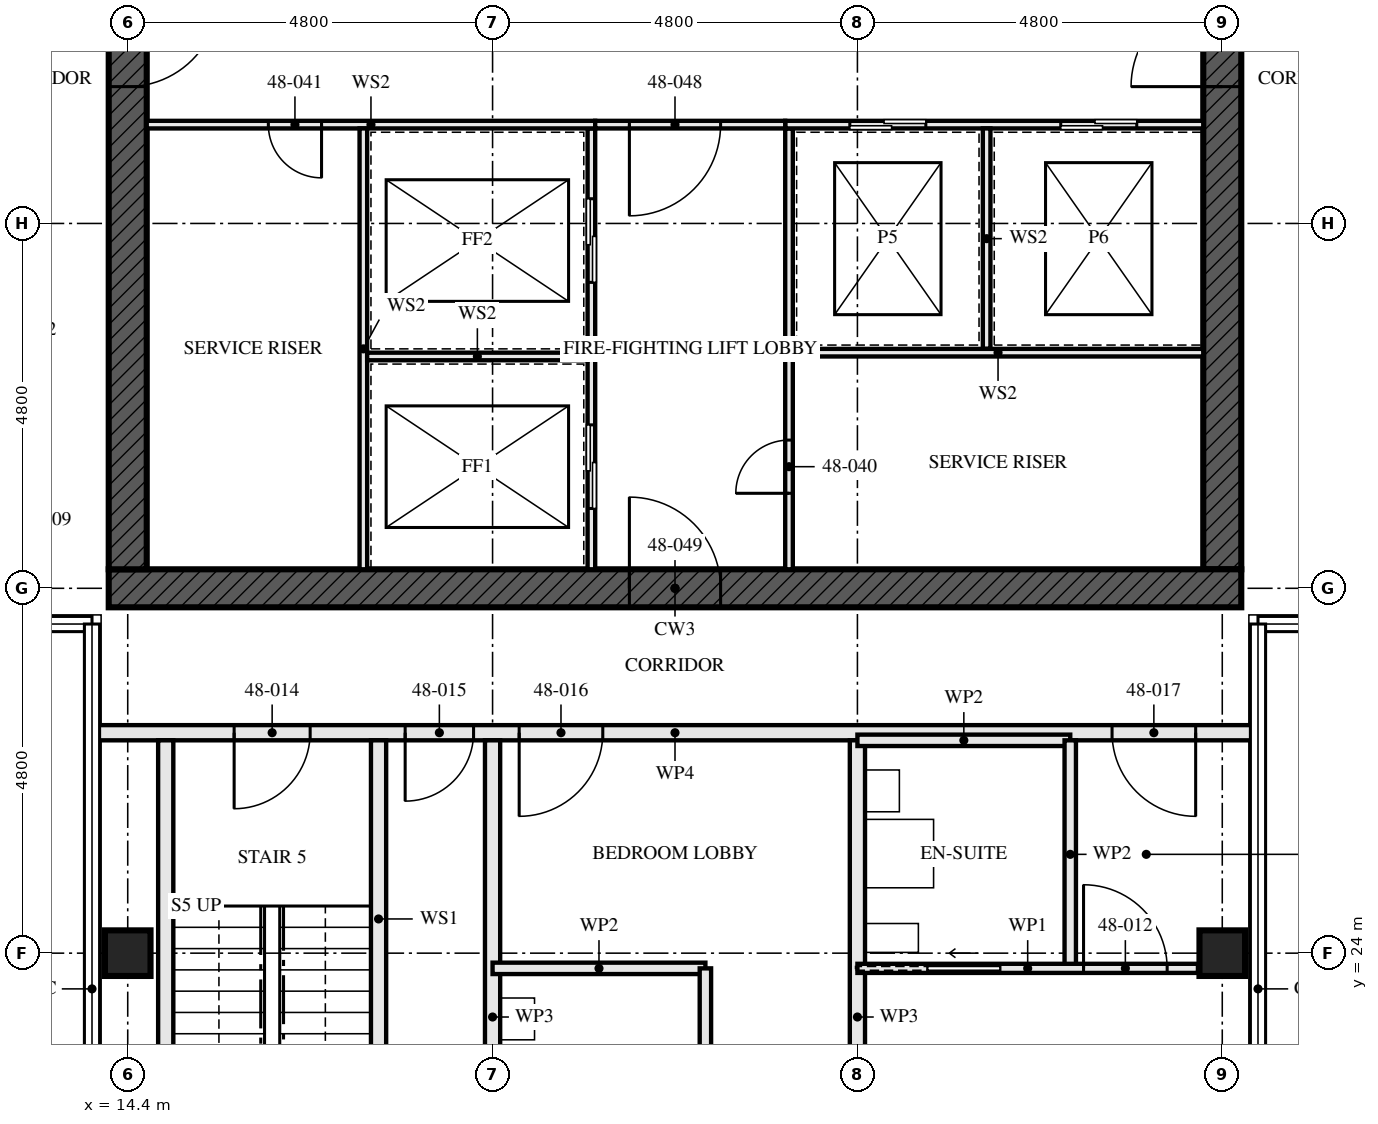
"""IFC4 building model, lengths in metres.
Left out: names, types, materials, properties, quantities, classifications, styles, units other than length and angle.
Written with IfcOpenShell. Run it as: python <this file> out.ifc"""

import sys

from ifc_helpers import new_model, si_unit, direction, frame, frame_2d, origin, origin_2d, place, context, subcontext, project, spatial, rectangle, hollow_rectangle, extrude, element, fill, save


model = new_model("IFC4")
c1 = context("Model", 3, precision=1e-05, world=origin(), true_north=direction((0.0, 1.0)))
c2 = subcontext(c1, "Body", "Model", "MODEL_VIEW")
j1 = project(units=[si_unit("LENGTHUNIT", "METRE"), si_unit("PLANEANGLEUNIT", "RADIAN")], contexts=[c1])
p1 = place(None, origin())
s1 = spatial("IfcSite", under=j1, at=p1, CompositionType="ELEMENT")
p2 = place(p1, origin())
s2 = spatial("IfcBuilding", under=s1, at=p2, CompositionType="ELEMENT")
p3 = place(p2, frame((0.0, 0.0, 176.0)))
s3 = spatial("IfcBuildingStorey", under=s2, at=p3, CompositionType="ELEMENT", Elevation=176.0)
for number, where, z_axis, x_axis in (
    (1, (14.4, 24.0, 0.0), (0.0, 0.0, 1.0), (1.0, 0.0, 0.0)),
    (2, (28.8, 24.0, 0.0), (0.0, 0.0, 1.0), (1.0, 0.0, 0.0)),
):
    element("IfcColumn", number, at=place(p3, frame(where, z_axis=z_axis, x_axis=x_axis)), inside=s3, PredefinedType="COLUMN", context=c2, shape_type="SweptSolid", body=[
        extrude(hollow_rectangle(XDim=0.6, YDim=0.6, WallThickness=0.08, at=origin_2d()), origin(), (0.0, 0.0, 1.0), 3.5),
    ])
p4 = place(p3, frame((14.15, 28.8, -0.17), z_axis=(0.0, 0.0, 1.0), x_axis=(1.0, 0.0, 0.0)))
e3 = element("IfcWall", 3, at=p4, inside=s3, PredefinedType="SHEAR", context=c2, shape_type="SweptSolid", body=[
    extrude(rectangle(XDim=14.9, YDim=0.5, at=frame_2d((7.45, 0.0))), origin(), (0.0, 0.0, 1.0), 3.5),
])
p5 = place(p4, frame((6.85, 0.0, 0.17)))
e4 = element("IfcOpeningElement", 4, at=p5, cuts=e3, PredefinedType="OPENING", context=c2, shape_type="SweptSolid", body=[
    extrude(rectangle(XDim=1.2, YDim=2.1, at=frame_2d((0.6, 1.05))), frame((0.0, 0.26, 0.0), z_axis=(0.0, -1.0, 0.0), x_axis=(1.0, 0.0, 0.0)), (0.0, 0.0, 1.0), 0.521),
])
p6 = place(p3, frame((14.4, 42.95, -0.17), z_axis=(0.0, 0.0, 1.0), x_axis=(0.0, -1.0, 0.0)))
e5 = element("IfcWall", 5, at=p6, inside=s3, PredefinedType="SHEAR", context=c2, shape_type="SweptSolid", body=[
    extrude(rectangle(XDim=13.9, YDim=0.5, at=frame_2d((6.95, 0.0))), origin(), (0.0, 0.0, 1.0), 3.5),
])
p7 = place(p6, frame((6.35, 0.0, 0.17)))
e6 = element("IfcOpeningElement", 6, at=p7, cuts=e5, PredefinedType="OPENING", context=c2, shape_type="SweptSolid", body=[
    extrude(rectangle(XDim=1.2, YDim=2.1, at=frame_2d((0.6, 1.05))), frame((0.0, 0.26, 0.0), z_axis=(0.0, -1.0, 0.0), x_axis=(1.0, 0.0, 0.0)), (0.0, 0.0, 1.0), 0.521),
])
p8 = place(p3, frame((28.8, 29.05, -0.17), z_axis=(0.0, 0.0, 1.0), x_axis=(0.0, 1.0, 0.0)))
e7 = element("IfcWall", 7, at=p8, inside=s3, PredefinedType="SHEAR", context=c2, shape_type="SweptSolid", body=[
    extrude(rectangle(XDim=13.9, YDim=0.5, at=frame_2d((6.95, 0.0))), origin(), (0.0, 0.0, 1.0), 3.5),
])
p9 = place(p8, frame((6.35, 0.0, 0.17)))
e8 = element("IfcOpeningElement", 8, at=p9, cuts=e7, PredefinedType="OPENING", context=c2, shape_type="SweptSolid", body=[
    extrude(rectangle(XDim=1.2, YDim=2.1, at=frame_2d((0.6, 1.05))), frame((0.0, 0.26, 0.0), z_axis=(0.0, -1.0, 0.0), x_axis=(1.0, 0.0, 0.0)), (0.0, 0.0, 1.0), 0.521),
])
for number, where, z_axis, x_axis in (
    (9, (14.9, 22.1, 0.0), (0.0, 0.0, 1.0), (0.0, 1.0, 0.0)),
    (10, (17.7, 22.1, 0.0), (0.0, 0.0, 1.0), (0.0, 1.0, 0.0)),
):
    element("IfcWall", number, at=place(p3, frame(where, z_axis=z_axis, x_axis=x_axis)), inside=s3, PredefinedType="SOLIDWALL", context=c2, shape_type="SweptSolid", body=[
        extrude(rectangle(XDim=4.7, YDim=0.2, at=frame_2d((2.35, 0.0))), origin(), (0.0, 0.0, 1.0), 2.99),
    ])
p10 = place(p3, frame((19.2, 19.52, 0.0), z_axis=(0.0, 0.0, 1.0), x_axis=(0.0, 1.0, 0.0)))
e11 = element("IfcWall", 11, at=p10, inside=s3, PredefinedType="PARTITIONING", context=c2, shape_type="SweptSolid", body=[
    extrude(rectangle(XDim=7.28, YDim=0.2, at=frame_2d((3.64, 0.0))), origin(), (0.0, 0.0, 1.0), 2.55),
])
p11 = place(p3, frame((22.0, 20.8, 0.0), z_axis=(0.0, 0.0, 1.0), x_axis=(0.0, 1.0, 0.0)))
e12 = element("IfcWall", 12, at=p11, inside=s3, PredefinedType="PARTITIONING", context=c2, shape_type="SweptSolid", body=[
    extrude(rectangle(XDim=3.0, YDim=0.15, at=frame_2d((1.5, 0.0))), origin(), (0.0, 0.0, 1.0), 3.33),
])
p12 = place(p3, frame((19.2, 23.8, 0.0), z_axis=(0.0, 0.0, 1.0), x_axis=(1.0, 0.0, 0.0)))
e13 = element("IfcWall", 13, at=p12, inside=s3, PredefinedType="PARTITIONING", context=c2, shape_type="SweptSolid", body=[
    extrude(rectangle(XDim=2.8, YDim=0.15, at=frame_2d((1.4, 0.0))), origin(), (0.0, 0.0, 1.0), 3.33),
])
p13 = place(p3, frame((24.0, 19.52, 0.0), z_axis=(0.0, 0.0, 1.0), x_axis=(0.0, 1.0, 0.0)))
e14 = element("IfcWall", 14, at=p13, inside=s3, PredefinedType="PARTITIONING", context=c2, shape_type="SweptSolid", body=[
    extrude(rectangle(XDim=7.28, YDim=0.2, at=frame_2d((3.64, 0.0))), origin(), (0.0, 0.0, 1.0), 2.55),
])
p14 = place(p3, frame((26.8, 23.8, 0.0), z_axis=(0.0, 0.0, 1.0), x_axis=(0.0, 1.0, 0.0)))
e15 = element("IfcWall", 15, at=p14, inside=s3, PredefinedType="PARTITIONING", context=c2, shape_type="SweptSolid", body=[
    extrude(rectangle(XDim=3.0, YDim=0.15, at=frame_2d((1.5, 0.0))), origin(), (0.0, 0.0, 1.0), 2.55),
])
p15 = place(p3, frame((24.0, 26.8, 0.0), z_axis=(0.0, 0.0, 1.0), x_axis=(1.0, 0.0, 0.0)))
e16 = element("IfcWall", 16, at=p15, inside=s3, PredefinedType="PARTITIONING", context=c2, shape_type="SweptSolid", body=[
    extrude(rectangle(XDim=2.8, YDim=0.15, at=frame_2d((1.4, 0.0))), origin(), (0.0, 0.0, 1.0), 3.33),
])
p16 = place(p3, frame((24.0, 23.8, 0.0), z_axis=(0.0, 0.0, 1.0), x_axis=(1.0, 0.0, 0.0)))
e17 = element("IfcWall", 17, at=p16, inside=s3, PredefinedType="PARTITIONING", context=c2, shape_type="SweptSolid", body=[
    extrude(rectangle(XDim=4.48, YDim=0.12, at=frame_2d((2.24, 0.0))), origin(), (0.0, 0.0, 1.0), 3.33),
])
p17 = place(p16, frame((2.975, 0.0, 0.0)))
e18 = element("IfcOpeningElement", 18, at=p17, cuts=e17, PredefinedType="OPENING", context=c2, shape_type="SweptSolid", body=[
    extrude(rectangle(XDim=1.1, YDim=2.1, at=frame_2d((0.55, 1.05))), frame((0.0, 0.071, 0.0), z_axis=(0.0, -1.0, 0.0), x_axis=(1.0, 0.0, 0.0)), (0.0, 0.0, 1.0), 0.141),
])
p18 = place(p16, frame((0.925, 0.0, 0.0)))
e19 = element("IfcOpeningElement", 19, at=p18, cuts=e17, PredefinedType="OPENING", context=c2, shape_type="SweptSolid", body=[
    extrude(rectangle(XDim=0.95, YDim=2.1, at=frame_2d((0.475, 1.05))), frame((0.0, 0.071, 0.0), z_axis=(0.0, -1.0, 0.0), x_axis=(1.0, 0.0, 0.0)), (0.0, 0.0, 1.0), 0.141),
])
p19 = place(p3, frame((13.95, 26.9, 0.0), z_axis=(0.0, 0.0, 1.0), x_axis=(1.0, 0.0, 0.0)))
e20 = element("IfcWall", 20, at=p19, inside=s3, PredefinedType="PARTITIONING", context=c2, shape_type="SweptSolid", body=[
    extrude(rectangle(XDim=15.3, YDim=0.2, at=frame_2d((7.65, 0.0))), origin(), (0.0, 0.0, 1.0), 2.32),
])
p20 = place(p19, frame((1.85, 0.0, 0.0)))
e21 = element("IfcOpeningElement", 21, at=p20, cuts=e20, PredefinedType="OPENING", context=c2, shape_type="SweptSolid", body=[
    extrude(rectangle(XDim=1.0, YDim=2.1, at=frame_2d((0.5, 1.05))), frame((0.0, 0.111, 0.0), z_axis=(0.0, -1.0, 0.0), x_axis=(1.0, 0.0, 0.0)), (0.0, 0.0, 1.0), 0.221),
])
p21 = place(p19, frame((4.1, 0.0, 0.0)))
e22 = element("IfcOpeningElement", 22, at=p21, cuts=e20, PredefinedType="OPENING", context=c2, shape_type="SweptSolid", body=[
    extrude(rectangle(XDim=0.9, YDim=2.1, at=frame_2d((0.45, 1.05))), frame((0.0, 0.111, 0.0), z_axis=(0.0, -1.0, 0.0), x_axis=(1.0, 0.0, 0.0)), (0.0, 0.0, 1.0), 0.221),
])
p22 = place(p19, frame((5.6, 0.0, 0.0)))
e23 = element("IfcOpeningElement", 23, at=p22, cuts=e20, PredefinedType="OPENING", context=c2, shape_type="SweptSolid", body=[
    extrude(rectangle(XDim=1.1, YDim=2.1, at=frame_2d((0.55, 1.05))), frame((0.0, 0.111, 0.0), z_axis=(0.0, -1.0, 0.0), x_axis=(1.0, 0.0, 0.0)), (0.0, 0.0, 1.0), 0.221),
])
p23 = place(p19, frame((13.4, 0.0, 0.0)))
e24 = element("IfcOpeningElement", 24, at=p23, cuts=e20, PredefinedType="OPENING", context=c2, shape_type="SweptSolid", body=[
    extrude(rectangle(XDim=1.1, YDim=2.1, at=frame_2d((0.55, 1.05))), frame((0.0, 0.111, 0.0), z_axis=(0.0, -1.0, 0.0), x_axis=(1.0, 0.0, 0.0)), (0.0, 0.0, 1.0), 0.221),
])
p24 = place(p3, frame((20.5, 29.05, 0.0), z_axis=(0.0, 0.0, 1.0), x_axis=(0.0, 1.0, 0.0)))
e25 = element("IfcWall", 25, at=p24, inside=s3, PredefinedType="SOLIDWALL", context=c2, shape_type="SweptSolid", body=[
    extrude(rectangle(XDim=5.8, YDim=0.1, at=frame_2d((2.9, 0.0))), origin(), (0.0, 0.0, 1.0), 3.33),
])
p25 = place(p24, frame((0.8, 0.0, 0.0)))
e26 = element("IfcOpeningElement", 26, at=p25, cuts=e25, PredefinedType="OPENING", context=c2, shape_type="SweptSolid", body=[
    extrude(rectangle(XDim=1.1, YDim=2.3, at=frame_2d((0.55, 1.15))), frame((0.0, 0.061, 0.0), z_axis=(0.0, -1.0, 0.0), x_axis=(1.0, 0.0, 0.0)), (0.0, 0.0, 1.0), 0.121),
])
p26 = place(p24, frame((3.775, 0.0, 0.0)))
e27 = element("IfcOpeningElement", 27, at=p26, cuts=e25, PredefinedType="OPENING", context=c2, shape_type="SweptSolid", body=[
    extrude(rectangle(XDim=1.1, YDim=2.3, at=frame_2d((0.55, 1.15))), frame((0.0, 0.061, 0.0), z_axis=(0.0, -1.0, 0.0), x_axis=(1.0, 0.0, 0.0)), (0.0, 0.0, 1.0), 0.121),
])
p27 = place(p3, frame((23.1, 29.05, 0.0), z_axis=(0.0, 0.0, 1.0), x_axis=(0.0, 1.0, 0.0)))
e28 = element("IfcWall", 28, at=p27, inside=s3, PredefinedType="SOLIDWALL", context=c2, shape_type="SweptSolid", body=[
    extrude(rectangle(XDim=5.8, YDim=0.1, at=frame_2d((2.9, 0.0))), origin(), (0.0, 0.0, 1.0), 3.33),
])
p28 = place(p27, frame((1.0, 0.0, 0.0)))
e29 = element("IfcOpeningElement", 29, at=p28, cuts=e28, PredefinedType="OPENING", context=c2, shape_type="SweptSolid", body=[
    extrude(rectangle(XDim=0.7, YDim=2.1, at=frame_2d((0.35, 1.05))), frame((0.0, 0.061, 0.0), z_axis=(0.0, -1.0, 0.0), x_axis=(1.0, 0.0, 0.0)), (0.0, 0.0, 1.0), 0.121),
])
p29 = place(p3, frame((14.65, 34.9, 0.0), z_axis=(0.0, 0.0, 1.0), x_axis=(1.0, 0.0, 0.0)))
e30 = element("IfcWall", 30, at=p29, inside=s3, PredefinedType="SOLIDWALL", context=c2, shape_type="SweptSolid", body=[
    extrude(rectangle(XDim=5.9, YDim=0.1, at=frame_2d((2.95, 0.0))), origin(), (0.0, 0.0, 1.0), 3.33),
])
p30 = place(p29, frame((1.6, 0.0, 0.0)))
e31 = element("IfcOpeningElement", 31, at=p30, cuts=e30, PredefinedType="OPENING", context=c2, shape_type="SweptSolid", body=[
    extrude(rectangle(XDim=0.7, YDim=2.1, at=frame_2d((0.35, 1.05))), frame((0.0, 0.061, 0.0), z_axis=(0.0, -1.0, 0.0), x_axis=(1.0, 0.0, 0.0)), (0.0, 0.0, 1.0), 0.121),
])
p31 = place(p3, frame((23.05, 34.9, 0.0), z_axis=(0.0, 0.0, 1.0), x_axis=(1.0, 0.0, 0.0)))
e32 = element("IfcWall", 32, at=p31, inside=s3, PredefinedType="SOLIDWALL", context=c2, shape_type="SweptSolid", body=[
    extrude(rectangle(XDim=5.5, YDim=0.1, at=frame_2d((2.75, 0.0))), origin(), (0.0, 0.0, 1.0), 3.33),
])
p32 = place(p31, frame((0.85, 0.0, 0.0)))
e33 = element("IfcOpeningElement", 33, at=p32, cuts=e32, PredefinedType="OPENING", context=c2, shape_type="SweptSolid", body=[
    extrude(rectangle(XDim=1.0, YDim=2.1, at=frame_2d((0.5, 1.05))), frame((0.0, 0.061, 0.0), z_axis=(0.0, -1.0, 0.0), x_axis=(1.0, 0.0, 0.0)), (0.0, 0.0, 1.0), 0.121),
])
p33 = place(p31, frame((3.625, 0.0, 0.0)))
e34 = element("IfcOpeningElement", 34, at=p33, cuts=e32, PredefinedType="OPENING", context=c2, shape_type="SweptSolid", body=[
    extrude(rectangle(XDim=1.0, YDim=2.1, at=frame_2d((0.5, 1.05))), frame((0.0, 0.061, 0.0), z_axis=(0.0, -1.0, 0.0), x_axis=(1.0, 0.0, 0.0)), (0.0, 0.0, 1.0), 0.121),
])
p34 = place(p3, frame((20.55, 34.9, 0.0), z_axis=(0.0, 0.0, 1.0), x_axis=(1.0, 0.0, 0.0)))
e35 = element("IfcWall", 35, at=p34, inside=s3, PredefinedType="SOLIDWALL", context=c2, shape_type="SweptSolid", body=[
    extrude(rectangle(XDim=2.5, YDim=0.1, at=frame_2d((1.25, 0.0))), origin(), (0.0, 0.0, 1.0), 3.33),
])
p35 = place(p34, frame((0.45, 0.0, 0.0)))
e36 = element("IfcOpeningElement", 36, at=p35, cuts=e35, PredefinedType="OPENING", context=c2, shape_type="SweptSolid", body=[
    extrude(rectangle(XDim=1.2, YDim=2.1, at=frame_2d((0.6, 1.05))), frame((0.0, 0.061, 0.0), z_axis=(0.0, -1.0, 0.0), x_axis=(1.0, 0.0, 0.0)), (0.0, 0.0, 1.0), 0.121),
])
p36 = place(p3, frame((17.5, 29.05, 0.0), z_axis=(0.0, 0.0, 1.0), x_axis=(0.0, 1.0, 0.0)))
e37 = element("IfcWall", 37, at=p36, inside=s3, PredefinedType="SOLIDWALL", context=c2, shape_type="SweptSolid", body=[
    extrude(rectangle(XDim=5.8, YDim=0.1, at=frame_2d((2.9, 0.0))), origin(), (0.0, 0.0, 1.0), 3.33),
])
p37 = place(p3, frame((17.55, 31.85, 0.0), z_axis=(0.0, 0.0, 1.0), x_axis=(1.0, 0.0, 0.0)))
e38 = element("IfcWall", 38, at=p37, inside=s3, PredefinedType="SOLIDWALL", context=c2, shape_type="SweptSolid", body=[
    extrude(rectangle(XDim=2.9, YDim=0.1, at=frame_2d((1.45, 0.0))), origin(), (0.0, 0.0, 1.0), 3.33),
])
p38 = place(p3, frame((25.7, 31.95, 0.0), z_axis=(0.0, 0.0, 1.0), x_axis=(0.0, 1.0, 0.0)))
e39 = element("IfcWall", 39, at=p38, inside=s3, PredefinedType="SOLIDWALL", context=c2, shape_type="SweptSolid", body=[
    extrude(rectangle(XDim=2.9, YDim=0.1, at=frame_2d((1.45, 0.0))), origin(), (0.0, 0.0, 1.0), 3.33),
])
p39 = place(p3, frame((23.15, 31.9, 0.0), z_axis=(0.0, 0.0, 1.0), x_axis=(1.0, 0.0, 0.0)))
e40 = element("IfcWall", 40, at=p39, inside=s3, PredefinedType="SOLIDWALL", context=c2, shape_type="SweptSolid", body=[
    extrude(rectangle(XDim=5.4, YDim=0.1, at=frame_2d((2.7, 0.0))), origin(), (0.0, 0.0, 1.0), 3.33),
])
p40 = place(p17, origin())
e41 = element("IfcDoor", 41, at=p40, inside=s3, OperationType="SINGLE_SWING_RIGHT", PredefinedType="DOOR", context=c2, shape_type="SweptSolid", body=[
    extrude(rectangle(XDim=1.1, YDim=2.1, at=frame_2d((0.55, 1.05))), frame((0.0, 0.022, 0.0), z_axis=(0.0, -1.0, 0.0), x_axis=(1.0, 0.0, 0.0)), (0.0, 0.0, 1.0), 0.044),
])
fill(e18, e41)
p41 = place(p18, origin())
e42 = element("IfcDoor", 42, at=p41, inside=s3, OperationType="SLIDING_TO_RIGHT", PredefinedType="DOOR", context=c2, shape_type="SweptSolid", body=[
    extrude(rectangle(XDim=0.95, YDim=2.1, at=frame_2d((0.475, 1.05))), frame((0.0, 0.022, 0.0), z_axis=(0.0, -1.0, 0.0), x_axis=(1.0, 0.0, 0.0)), (0.0, 0.0, 1.0), 0.044),
])
fill(e19, e42)
p42 = place(p20, frame((1.0, 0.0, 0.0), z_axis=(0.0, 0.0, 1.0), x_axis=(-1.0, 0.0, 0.0)))
e43 = element("IfcDoor", 43, at=p42, inside=s3, OperationType="SINGLE_SWING_LEFT", PredefinedType="DOOR", context=c2, shape_type="SweptSolid", body=[
    extrude(rectangle(XDim=1.0, YDim=2.1, at=frame_2d((0.5, 1.05))), frame((0.0, 0.032, 0.0), z_axis=(0.0, -1.0, 0.0), x_axis=(1.0, 0.0, 0.0)), (0.0, 0.0, 1.0), 0.064),
])
fill(e21, e43)
p43 = place(p21, frame((0.9, 0.0, 0.0), z_axis=(0.0, 0.0, 1.0), x_axis=(-1.0, 0.0, 0.0)))
e44 = element("IfcDoor", 44, at=p43, inside=s3, OperationType="SINGLE_SWING_LEFT", PredefinedType="DOOR", context=c2, shape_type="SweptSolid", body=[
    extrude(rectangle(XDim=0.9, YDim=2.1, at=frame_2d((0.45, 1.05))), frame((0.0, 0.027, 0.0), z_axis=(0.0, -1.0, 0.0), x_axis=(1.0, 0.0, 0.0)), (0.0, 0.0, 1.0), 0.054),
])
fill(e22, e44)
p44 = place(p22, frame((1.1, 0.0, 0.0), z_axis=(0.0, 0.0, 1.0), x_axis=(-1.0, 0.0, 0.0)))
e45 = element("IfcDoor", 45, at=p44, inside=s3, OperationType="SINGLE_SWING_LEFT", PredefinedType="DOOR", context=c2, shape_type="SweptSolid", body=[
    extrude(rectangle(XDim=1.1, YDim=2.1, at=frame_2d((0.55, 1.05))), frame((0.0, 0.027, 0.0), z_axis=(0.0, -1.0, 0.0), x_axis=(1.0, 0.0, 0.0)), (0.0, 0.0, 1.0), 0.054),
])
fill(e23, e45)
p45 = place(p23, frame((1.1, 0.0, 0.0), z_axis=(0.0, 0.0, 1.0), x_axis=(-1.0, 0.0, 0.0)))
e46 = element("IfcDoor", 46, at=p45, inside=s3, OperationType="SINGLE_SWING_RIGHT", PredefinedType="DOOR", context=c2, shape_type="SweptSolid", body=[
    extrude(rectangle(XDim=1.1, YDim=2.1, at=frame_2d((0.55, 1.05))), frame((0.0, 0.027, 0.0), z_axis=(0.0, -1.0, 0.0), x_axis=(1.0, 0.0, 0.0)), (0.0, 0.0, 1.0), 0.054),
])
fill(e24, e46)
p46 = place(p25, origin())
e47 = element("IfcDoor", 47, at=p46, inside=s3, OperationType="SLIDING_TO_LEFT", PredefinedType="DOOR", context=c2, shape_type="SweptSolid", body=[
    extrude(rectangle(XDim=1.1, YDim=2.3, at=frame_2d((0.55, 1.15))), frame((0.0, 0.05, 0.0), z_axis=(0.0, -1.0, 0.0), x_axis=(1.0, 0.0, 0.0)), (0.0, 0.0, 1.0), 0.1),
])
fill(e26, e47)
p47 = place(p26, origin())
e48 = element("IfcDoor", 48, at=p47, inside=s3, OperationType="SLIDING_TO_LEFT", PredefinedType="DOOR", context=c2, shape_type="SweptSolid", body=[
    extrude(rectangle(XDim=1.1, YDim=2.3, at=frame_2d((0.55, 1.15))), frame((0.0, 0.05, 0.0), z_axis=(0.0, -1.0, 0.0), x_axis=(1.0, 0.0, 0.0)), (0.0, 0.0, 1.0), 0.1),
])
fill(e27, e48)
p48 = place(p28, origin())
e49 = element("IfcDoor", 49, at=p48, inside=s3, OperationType="SINGLE_SWING_RIGHT", PredefinedType="DOOR", context=c2, shape_type="SweptSolid", body=[
    extrude(rectangle(XDim=0.7, YDim=2.1, at=frame_2d((0.35, 1.05))), frame((0.0, 0.027, 0.0), z_axis=(0.0, -1.0, 0.0), x_axis=(1.0, 0.0, 0.0)), (0.0, 0.0, 1.0), 0.054),
])
fill(e29, e49)
p49 = place(p30, frame((0.7, 0.0, 0.0), z_axis=(0.0, 0.0, 1.0), x_axis=(-1.0, 0.0, 0.0)))
e50 = element("IfcDoor", 50, at=p49, inside=s3, OperationType="SINGLE_SWING_RIGHT", PredefinedType="DOOR", context=c2, shape_type="SweptSolid", body=[
    extrude(rectangle(XDim=0.7, YDim=2.1, at=frame_2d((0.35, 1.05))), frame((0.0, 0.027, 0.0), z_axis=(0.0, -1.0, 0.0), x_axis=(1.0, 0.0, 0.0)), (0.0, 0.0, 1.0), 0.054),
])
fill(e31, e50)
p50 = place(p32, origin())
e51 = element("IfcDoor", 51, at=p50, inside=s3, OperationType="SLIDING_TO_LEFT", PredefinedType="DOOR", context=c2, shape_type="SweptSolid", body=[
    extrude(rectangle(XDim=1.0, YDim=2.1, at=frame_2d((0.5, 1.05))), frame((0.0, 0.05, 0.0), z_axis=(0.0, -1.0, 0.0), x_axis=(1.0, 0.0, 0.0)), (0.0, 0.0, 1.0), 0.1),
])
fill(e33, e51)
p51 = place(p33, origin())
e52 = element("IfcDoor", 52, at=p51, inside=s3, OperationType="SLIDING_TO_LEFT", PredefinedType="DOOR", context=c2, shape_type="SweptSolid", body=[
    extrude(rectangle(XDim=1.0, YDim=2.1, at=frame_2d((0.5, 1.05))), frame((0.0, 0.05, 0.0), z_axis=(0.0, -1.0, 0.0), x_axis=(1.0, 0.0, 0.0)), (0.0, 0.0, 1.0), 0.1),
])
fill(e34, e52)
p52 = place(p35, frame((1.2, 0.0, 0.0), z_axis=(0.0, 0.0, 1.0), x_axis=(-1.0, 0.0, 0.0)))
e53 = element("IfcDoor", 53, at=p52, inside=s3, OperationType="SINGLE_SWING_LEFT", PredefinedType="DOOR", context=c2, shape_type="SweptSolid", body=[
    extrude(rectangle(XDim=1.2, YDim=2.1, at=frame_2d((0.6, 1.05))), frame((0.0, 0.027, 0.0), z_axis=(0.0, -1.0, 0.0), x_axis=(1.0, 0.0, 0.0)), (0.0, 0.0, 1.0), 0.054),
])
fill(e36, e53)
p53 = place(p5, origin())
e54 = element("IfcDoor", 54, at=p53, inside=s3, OperationType="SINGLE_SWING_LEFT", PredefinedType="DOOR", context=c2, shape_type="SweptSolid", body=[
    extrude(rectangle(XDim=1.2, YDim=2.1, at=frame_2d((0.6, 1.05))), frame((0.0, 0.027, 0.0), z_axis=(0.0, -1.0, 0.0), x_axis=(1.0, 0.0, 0.0)), (0.0, 0.0, 1.0), 0.054),
])
fill(e4, e54)
p54 = place(p7, origin())
e55 = element("IfcDoor", 55, at=p54, inside=s3, OperationType="SINGLE_SWING_LEFT", PredefinedType="DOOR", context=c2, shape_type="SweptSolid", body=[
    extrude(rectangle(XDim=1.2, YDim=2.1, at=frame_2d((0.6, 1.05))), frame((0.0, 0.027, 0.0), z_axis=(0.0, -1.0, 0.0), x_axis=(1.0, 0.0, 0.0)), (0.0, 0.0, 1.0), 0.054),
])
fill(e6, e55)
p55 = place(p9, origin())
e56 = element("IfcDoor", 56, at=p55, inside=s3, OperationType="SINGLE_SWING_LEFT", PredefinedType="DOOR", context=c2, shape_type="SweptSolid", body=[
    extrude(rectangle(XDim=1.2, YDim=2.1, at=frame_2d((0.6, 1.05))), frame((0.0, 0.027, 0.0), z_axis=(0.0, -1.0, 0.0), x_axis=(1.0, 0.0, 0.0)), (0.0, 0.0, 1.0), 0.054),
])
fill(e8, e56)
save(model, sys.argv[1])
